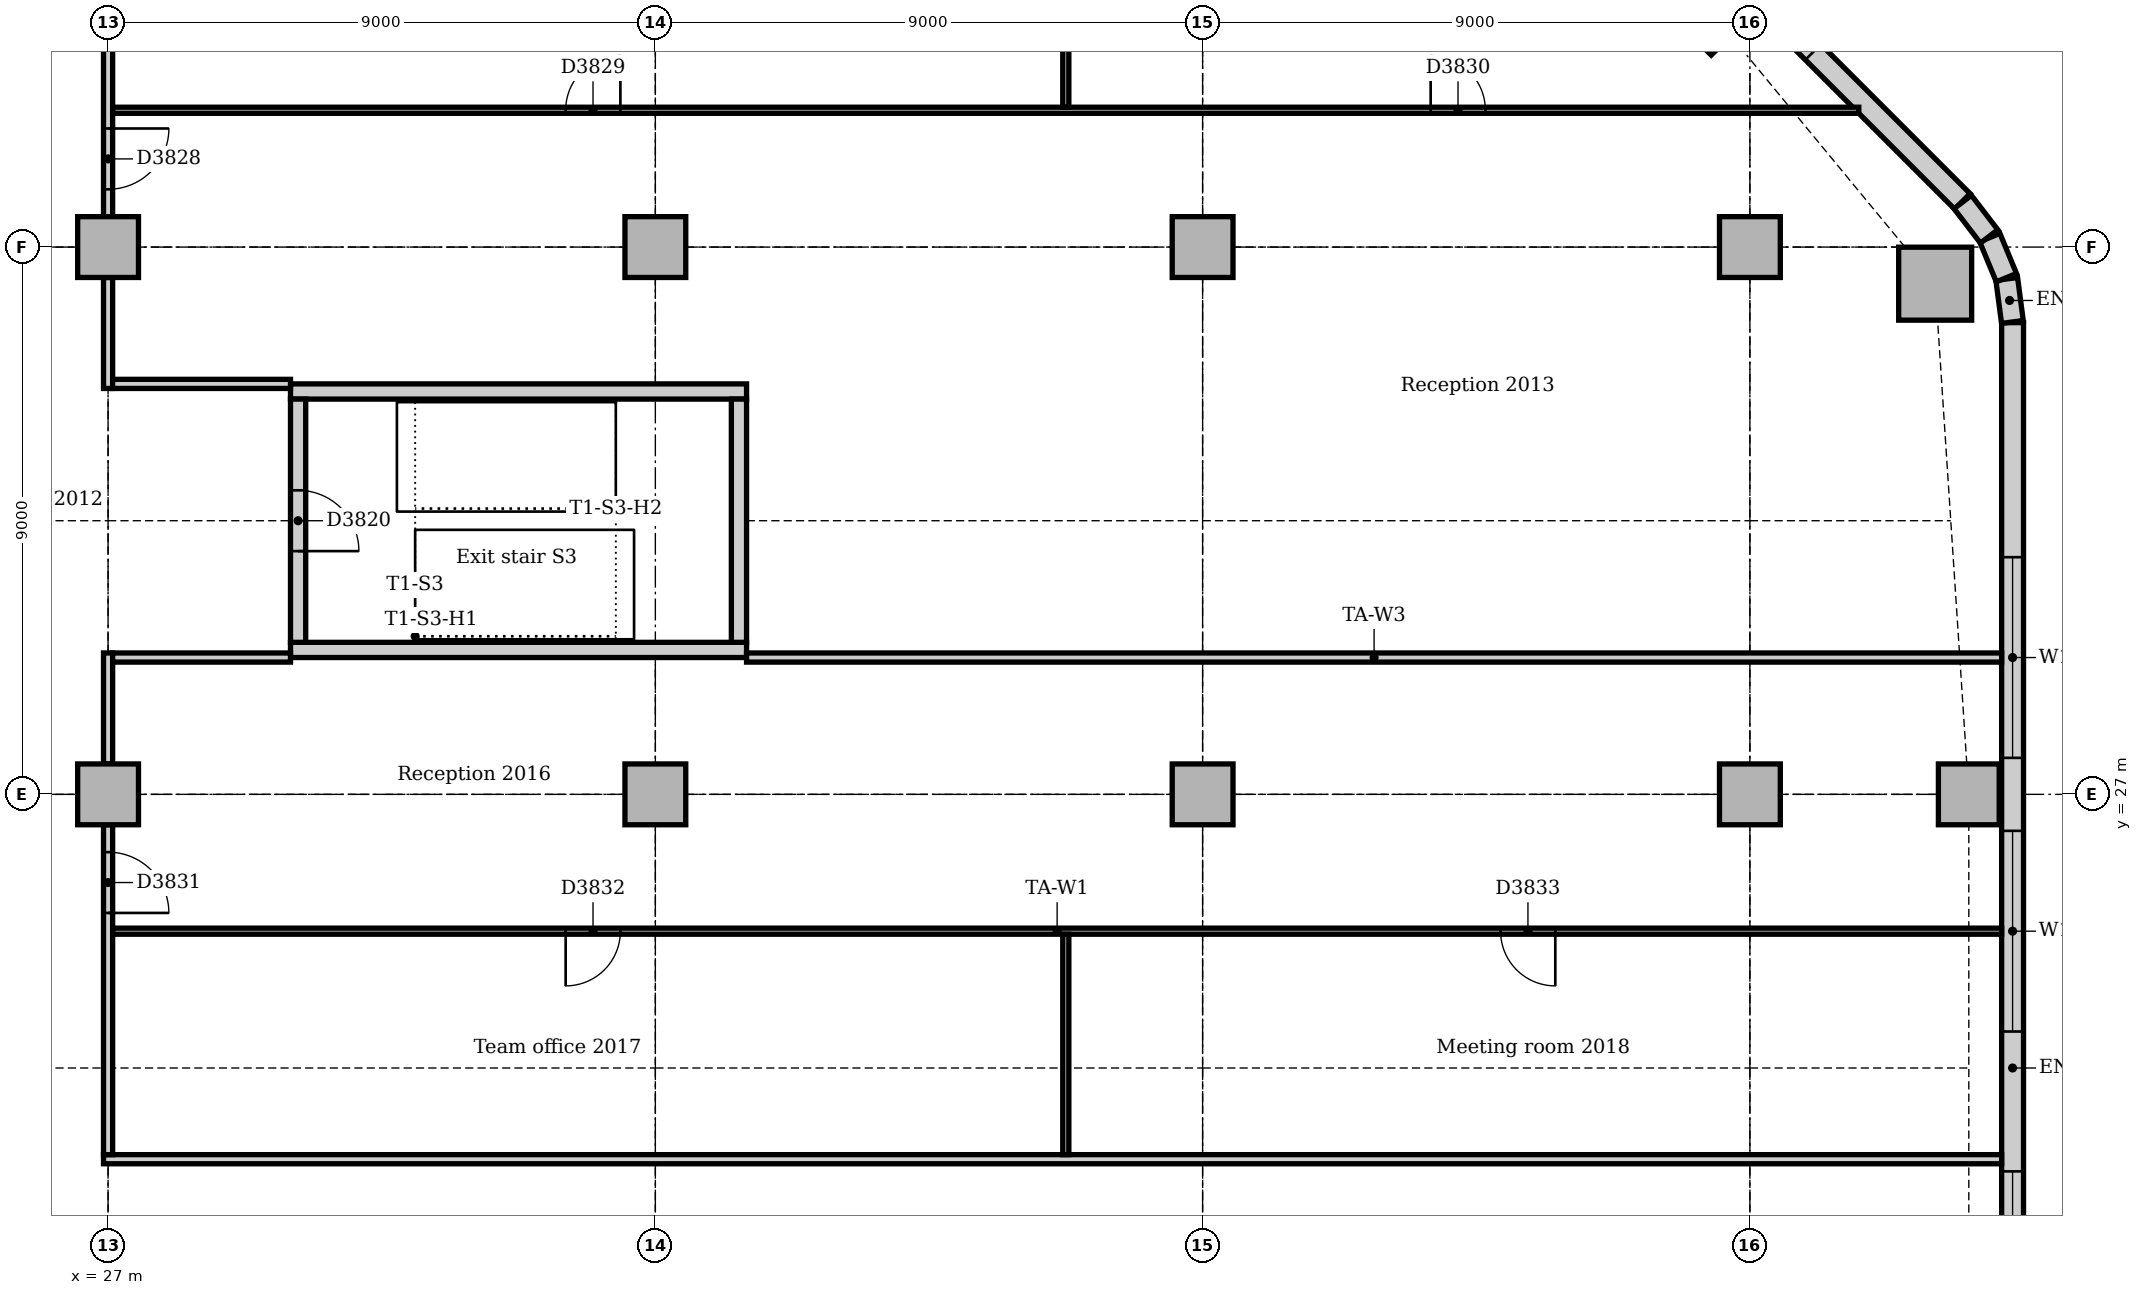
"""IFC4 building model, lengths in metres.
Left out: names, types, materials, properties, quantities, classifications, styles, units other than length and angle.
Written with IfcOpenShell. Run it as: python <this file> out.ifc"""

import sys

from ifc_helpers import new_model, si_unit, direction, frame, frame_2d, origin, origin_2d, place, context, subcontext, project, spatial, rectangle, extrude, element, fill, save


model = new_model("IFC4")
c1 = context("Model", 3, precision=1e-05, world=origin(), true_north=direction((0.0, 1.0)))
c2 = subcontext(c1, "Body", "Model", "MODEL_VIEW")
j1 = project(units=[si_unit("LENGTHUNIT", "METRE"), si_unit("PLANEANGLEUNIT", "RADIAN")], contexts=[c1])
p1 = place(None, origin())
s1 = spatial("IfcSite", under=j1, at=p1, CompositionType="ELEMENT")
p2 = place(p1, origin())
s2 = spatial("IfcBuilding", under=s1, at=p2, CompositionType="ELEMENT")
p3 = place(p2, frame((0.0, 0.0, 87.0)))
s3 = spatial("IfcBuildingStorey", under=s2, at=p3, CompositionType="ELEMENT", Elevation=87.0)
for number, where, z_axis, x_axis in (
    (1, (30.0, 29.375, 0.0), (0.0, 0.0, 1.0), (1.0, 0.0, 0.0)),
    (2, (37.5, 33.625, 0.0), (0.0, 0.0, 1.0), (-1.0, 0.0, 0.0)),
):
    element("IfcWall", number, at=place(p3, frame(where, z_axis=z_axis, x_axis=x_axis)), inside=s3, PredefinedType="SOLIDWALL", context=c2, shape_type="SweptSolid", body=[
        extrude(rectangle(XDim=7.5, YDim=0.25, at=frame_2d((3.75, 0.0))), origin(), (0.0, 0.0, 1.0), 4.0),
    ])
p4 = place(p3, frame((37.375, 29.5, 0.0), z_axis=(0.0, 0.0, 1.0), x_axis=(0.0, 1.0, 0.0)))
e3 = element("IfcWall", 3, at=p4, inside=s3, PredefinedType="SOLIDWALL", context=c2, shape_type="SweptSolid", body=[
    extrude(rectangle(XDim=4.0, YDim=0.25, at=frame_2d((2.0, 0.0))), origin(), (0.0, 0.0, 1.0), 4.0),
])
p5 = place(p3, frame((30.125, 33.5, 0.0), z_axis=(0.0, 0.0, 1.0), x_axis=(0.0, -1.0, 0.0)))
e4 = element("IfcWall", 4, at=p5, inside=s3, PredefinedType="SOLIDWALL", context=c2, shape_type="SweptSolid", body=[
    extrude(rectangle(XDim=4.0, YDim=0.25, at=frame_2d((2.0, 0.0))), origin(), (0.0, 0.0, 1.0), 4.0),
])
p6 = place(p5, frame((1.5, 0.0, 0.0)))
e5 = element("IfcOpeningElement", 5, at=p6, cuts=e4, PredefinedType="OPENING", context=c2, shape_type="SweptSolid", body=[
    extrude(rectangle(XDim=1.0, YDim=2.1, at=frame_2d((0.5, 1.05))), frame((0.0, 0.135, 0.0), z_axis=(0.0, -1.0, 0.0), x_axis=(1.0, 0.0, 0.0)), (0.0, 0.0, 1.0), 0.27),
])
p7 = place(p3, frame((57.047, 35.398, 0.0), z_axis=(0.0, 0.0, 1.0), x_axis=(1.0, 0.0, 0.0)))
e6 = element("IfcColumn", 6, at=p7, inside=s3, PredefinedType="COLUMN", context=c2, shape_type="SweptSolid", body=[
    extrude(rectangle(XDim=1.2, YDim=1.2, at=origin_2d()), origin(), (0.0, 0.0, 1.0), 3.85),
])
for number, where, z_axis, x_axis in (
    (7, (57.6, 27.0, 0.0), (0.0, 0.0, 1.0), (1.0, 0.0, 0.0)),
    (8, (53.364, 39.864, 0.0), (0.0, 0.0, 1.0), (0.707, 0.707, 0.0)),
    (9, (27.0, 27.0, 0.0), (0.0, 0.0, 1.0), (1.0, 0.0, 0.0)),
    (10, (27.0, 36.0, 0.0), (0.0, 0.0, 1.0), (1.0, 0.0, 0.0)),
    (11, (36.0, 27.0, 0.0), (0.0, 0.0, 1.0), (1.0, 0.0, 0.0)),
    (12, (36.0, 36.0, 0.0), (0.0, 0.0, 1.0), (1.0, 0.0, 0.0)),
    (13, (45.0, 27.0, 0.0), (0.0, 0.0, 1.0), (1.0, 0.0, 0.0)),
    (14, (45.0, 36.0, 0.0), (0.0, 0.0, 1.0), (1.0, 0.0, 0.0)),
    (15, (54.0, 27.0, 0.0), (0.0, 0.0, 1.0), (1.0, 0.0, 0.0)),
    (16, (54.0, 36.0, 0.0), (0.0, 0.0, 1.0), (1.0, 0.0, 0.0)),
):
    element("IfcColumn", number, at=place(p3, frame(where, z_axis=z_axis, x_axis=x_axis)), inside=s3, PredefinedType="COLUMN", context=c2, shape_type="SweptSolid", body=[
        extrude(rectangle(XDim=1.0, YDim=1.0, at=origin_2d()), origin(), (0.0, 0.0, 1.0), 3.85),
    ])
p8 = place(p3, frame((58.32, 10.243, 0.0), z_axis=(0.0, 0.0, 1.0), x_axis=(0.0, 1.0, 0.0)))
e17 = element("IfcWall", 17, at=p8, inside=s3, PredefinedType="STANDARD", context=c2, shape_type="SweptSolid", body=[
    extrude(rectangle(XDim=24.515, YDim=0.36, at=frame_2d((12.257, 0.0))), origin(), (0.0, 0.0, 1.0), 3.85),
])
p9 = place(p8, frame((3.857, 0.0, 0.9)))
e18 = element("IfcOpeningElement", 18, at=p9, cuts=e17, PredefinedType="OPENING", context=c2, shape_type="SweptSolid", body=[
    extrude(rectangle(XDim=3.3, YDim=1.6, at=frame_2d((1.65, 0.8))), frame((0.0, 0.19, 0.0), z_axis=(0.0, -1.0, 0.0), x_axis=(1.0, 0.0, 0.0)), (0.0, 0.0, 1.0), 0.38),
])
p10 = place(p8, frame((8.757, 0.0, 0.9)))
e19 = element("IfcOpeningElement", 19, at=p10, cuts=e17, PredefinedType="OPENING", context=c2, shape_type="SweptSolid", body=[
    extrude(rectangle(XDim=1.8, YDim=1.6, at=frame_2d((0.9, 0.8))), frame((0.0, 0.19, 0.0), z_axis=(0.0, -1.0, 0.0), x_axis=(1.0, 0.0, 0.0)), (0.0, 0.0, 1.0), 0.38),
])
p11 = place(p8, frame((12.857, 0.0, 0.9)))
e20 = element("IfcOpeningElement", 20, at=p11, cuts=e17, PredefinedType="OPENING", context=c2, shape_type="SweptSolid", body=[
    extrude(rectangle(XDim=3.3, YDim=1.6, at=frame_2d((1.65, 0.8))), frame((0.0, 0.19, 0.0), z_axis=(0.0, -1.0, 0.0), x_axis=(1.0, 0.0, 0.0)), (0.0, 0.0, 1.0), 0.38),
])
p12 = place(p8, frame((17.357, 0.0, 0.9)))
e21 = element("IfcOpeningElement", 21, at=p12, cuts=e17, PredefinedType="OPENING", context=c2, shape_type="SweptSolid", body=[
    extrude(rectangle(XDim=3.3, YDim=1.6, at=frame_2d((1.65, 0.8))), frame((0.0, 0.19, 0.0), z_axis=(0.0, -1.0, 0.0), x_axis=(1.0, 0.0, 0.0)), (0.0, 0.0, 1.0), 0.38),
])
p13 = place(p3, frame((57.494, 36.751, 0.0), z_axis=(0.0, 0.0, 1.0), x_axis=(-0.707106781187, 0.707106781187, 0.0)))
e22 = element("IfcWall", 22, at=p13, inside=s3, PredefinedType="STANDARD", context=c2, shape_type="SweptSolid", body=[
    extrude(rectangle(XDim=10.243, YDim=0.36, at=frame_2d((5.121, 0.0))), origin(), (0.0, 0.0, 1.0), 3.85),
])
p14 = place(p13, frame((3.471, 0.0, 0.9)))
e23 = element("IfcOpeningElement", 23, at=p14, cuts=e22, PredefinedType="OPENING", context=c2, shape_type="SweptSolid", body=[
    extrude(rectangle(XDim=3.3, YDim=1.6, at=frame_2d((1.65, 0.8))), frame((0.0, 0.19, 0.0), z_axis=(0.0, -1.0, 0.0), x_axis=(1.0, 0.0, 0.0)), (0.0, 0.0, 1.0), 0.38),
])
for number, where, z_axis, x_axis in (
    (24, (58.317, 34.769, 0.0), (0.0, 0.0, 1.0), (-0.131, 0.991, 0.0)),
    (25, (58.218, 35.497, 0.0), (0.0, 0.0, 1.0), (-0.383, 0.924, 0.0)),
):
    element("IfcWall", number, at=place(p3, frame(where, z_axis=z_axis, x_axis=x_axis)), inside=s3, PredefinedType="STANDARD", context=c2, shape_type="SweptSolid", body=[
        extrude(rectangle(XDim=0.713, YDim=0.36, at=frame_2d((0.356, 0.0))), origin(), (0.0, 0.0, 1.0), 3.85),
    ])
p15 = place(p3, frame((57.934, 36.175, 0.0), z_axis=(0.0, 0.0, 1.0), x_axis=(-0.608802368033, 0.793321924995, 0.0)))
e26 = element("IfcWall", 26, at=p15, inside=s3, PredefinedType="STANDARD", context=c2, shape_type="SweptSolid", body=[
    extrude(rectangle(XDim=0.713, YDim=0.36, at=frame_2d((0.357, 0.0))), origin(), (0.0, 0.0, 1.0), 3.85),
])
p16 = place(p3, frame((26.925, 21.0, 0.0), z_axis=(0.0, 0.0, 1.0), x_axis=(1.0, 0.0, 0.0)))
e27 = element("IfcWall", 27, at=p16, inside=s3, PredefinedType="PARTITIONING", context=c2, shape_type="SweptSolid", body=[
    extrude(rectangle(XDim=31.215, YDim=0.15, at=frame_2d((15.607, 0.0))), origin(), (0.0, 0.0, 1.0), 3.85),
])
p17 = place(p3, frame((27.0, 33.675, 0.0), z_axis=(0.0, 0.0, 1.0), x_axis=(0.0, 1.0, 0.0)))
e28 = element("IfcWall", 28, at=p17, inside=s3, PredefinedType="PARTITIONING", context=c2, shape_type="SweptSolid", body=[
    extrude(rectangle(XDim=1.825, YDim=0.15, at=frame_2d((0.912, 0.0))), origin(), (0.0, 0.0, 1.0), 3.158),
])
p18 = place(p3, frame((27.0, 36.5, 0.0), z_axis=(0.0, 0.0, 1.0), x_axis=(0.0, 1.0, 0.0)))
e29 = element("IfcWall", 29, at=p18, inside=s3, PredefinedType="PARTITIONING", context=c2, shape_type="SweptSolid", body=[
    extrude(rectangle(XDim=7.1, YDim=0.15, at=frame_2d((3.55, 0.0))), origin(), (0.0, 0.0, 1.0), 3.158),
])
p19 = place(p18, frame((0.45, 0.0, 0.0)))
e30 = element("IfcOpeningElement", 30, at=p19, cuts=e29, PredefinedType="OPENING", context=c2, shape_type="SweptSolid", body=[
    extrude(rectangle(XDim=1.0, YDim=2.1, at=frame_2d((0.5, 1.05))), frame((0.0, 0.085, 0.0), z_axis=(0.0, -1.0, 0.0), x_axis=(1.0, 0.0, 0.0)), (0.0, 0.0, 1.0), 0.17),
])
p20 = place(p3, frame((27.0, 21.075, 0.0), z_axis=(0.0, 0.0, 1.0), x_axis=(0.0, 1.0, 0.0)))
e31 = element("IfcWall", 31, at=p20, inside=s3, PredefinedType="PARTITIONING", context=c2, shape_type="SweptSolid", body=[
    extrude(rectangle(XDim=5.425, YDim=0.15, at=frame_2d((2.712, 0.0))), origin(), (0.0, 0.0, 1.0), 3.158),
])
p21 = place(p20, frame((3.975, 0.0, 0.0)))
e32 = element("IfcOpeningElement", 32, at=p21, cuts=e31, PredefinedType="OPENING", context=c2, shape_type="SweptSolid", body=[
    extrude(rectangle(XDim=1.0, YDim=2.1, at=frame_2d((0.5, 1.05))), frame((0.0, 0.085, 0.0), z_axis=(0.0, -1.0, 0.0), x_axis=(1.0, 0.0, 0.0)), (0.0, 0.0, 1.0), 0.17),
])
p22 = place(p3, frame((27.0, 27.5, 0.0), z_axis=(0.0, 0.0, 1.0), x_axis=(0.0, 1.0, 0.0)))
e33 = element("IfcWall", 33, at=p22, inside=s3, PredefinedType="PARTITIONING", context=c2, shape_type="SweptSolid", body=[
    extrude(rectangle(XDim=1.825, YDim=0.15, at=frame_2d((0.912, 0.0))), origin(), (0.0, 0.0, 1.0), 3.158),
])
for number, where, z_axis, x_axis in (
    (34, (27.075, 29.25, 0.0), (0.0, 0.0, 1.0), (1.0, 0.0, 0.0)),
    (35, (27.075, 33.75, 0.0), (0.0, 0.0, 1.0), (1.0, 0.0, 0.0)),
):
    element("IfcWall", number, at=place(p3, frame(where, z_axis=z_axis, x_axis=x_axis)), inside=s3, PredefinedType="PARTITIONING", context=c2, shape_type="SweptSolid", body=[
        extrude(rectangle(XDim=2.925, YDim=0.15, at=frame_2d((1.462, 0.0))), origin(), (0.0, 0.0, 1.0), 3.85),
    ])
p23 = place(p3, frame((37.5, 29.25, 0.0), z_axis=(0.0, 0.0, 1.0), x_axis=(1.0, 0.0, 0.0)))
e36 = element("IfcWall", 36, at=p23, inside=s3, PredefinedType="PARTITIONING", context=c2, shape_type="SweptSolid", body=[
    extrude(rectangle(XDim=20.64, YDim=0.15, at=frame_2d((10.32, 0.0))), origin(), (0.0, 0.0, 1.0), 3.85),
])
p24 = place(p3, frame((27.075, 24.75, 0.0), z_axis=(0.0, 0.0, 1.0), x_axis=(1.0, 0.0, 0.0)))
e37 = element("IfcWall", 37, at=p24, inside=s3, PredefinedType="PARTITIONING", context=c2, shape_type="SweptSolid", body=[
    extrude(rectangle(XDim=31.065, YDim=0.1, at=frame_2d((15.533, 0.0))), origin(), (0.0, 0.0, 1.0), 3.85),
])
p25 = place(p24, frame((7.45, 0.0, 0.0)))
e38 = element("IfcOpeningElement", 38, at=p25, cuts=e37, PredefinedType="OPENING", context=c2, shape_type="SweptSolid", body=[
    extrude(rectangle(XDim=0.9, YDim=2.1, at=frame_2d((0.45, 1.05))), frame((0.0, 0.06, 0.0), z_axis=(0.0, -1.0, 0.0), x_axis=(1.0, 0.0, 0.0)), (0.0, 0.0, 1.0), 0.12),
])
p26 = place(p24, frame((22.825, 0.0, 0.0)))
e39 = element("IfcOpeningElement", 39, at=p26, cuts=e37, PredefinedType="OPENING", context=c2, shape_type="SweptSolid", body=[
    extrude(rectangle(XDim=0.9, YDim=2.1, at=frame_2d((0.45, 1.05))), frame((0.0, 0.06, 0.0), z_axis=(0.0, -1.0, 0.0), x_axis=(1.0, 0.0, 0.0)), (0.0, 0.0, 1.0), 0.12),
])
p27 = place(p3, frame((27.075, 38.25, 0.0), z_axis=(0.0, 0.0, 1.0), x_axis=(1.0, 0.0, 0.0)))
e40 = element("IfcWall", 40, at=p27, inside=s3, PredefinedType="PARTITIONING", context=c2, shape_type="SweptSolid", body=[
    extrude(rectangle(XDim=28.716, YDim=0.1, at=frame_2d((14.358, 0.0))), origin(), (0.0, 0.0, 1.0), 3.85),
])
p28 = place(p27, frame((7.45, 0.0, 0.0)))
e41 = element("IfcOpeningElement", 41, at=p28, cuts=e40, PredefinedType="OPENING", context=c2, shape_type="SweptSolid", body=[
    extrude(rectangle(XDim=0.9, YDim=2.1, at=frame_2d((0.45, 1.05))), frame((0.0, 0.06, 0.0), z_axis=(0.0, -1.0, 0.0), x_axis=(1.0, 0.0, 0.0)), (0.0, 0.0, 1.0), 0.12),
])
p29 = place(p27, frame((21.675, 0.0, 0.0)))
e42 = element("IfcOpeningElement", 42, at=p29, cuts=e40, PredefinedType="OPENING", context=c2, shape_type="SweptSolid", body=[
    extrude(rectangle(XDim=0.9, YDim=2.1, at=frame_2d((0.45, 1.05))), frame((0.0, 0.06, 0.0), z_axis=(0.0, -1.0, 0.0), x_axis=(1.0, 0.0, 0.0)), (0.0, 0.0, 1.0), 0.12),
])
p30 = place(p3, frame((42.75, 38.3, 0.0), z_axis=(0.0, 0.0, 1.0), x_axis=(0.0, 1.0, 0.0)))
e43 = element("IfcWall", 43, at=p30, inside=s3, PredefinedType="PARTITIONING", context=c2, shape_type="SweptSolid", body=[
    extrude(rectangle(XDim=6.34, YDim=0.1, at=frame_2d((3.17, 0.0))), origin(), (0.0, 0.0, 1.0), 3.85),
])
p31 = place(p3, frame((42.75, 21.075, 0.0), z_axis=(0.0, 0.0, 1.0), x_axis=(0.0, 1.0, 0.0)))
e44 = element("IfcWall", 44, at=p31, inside=s3, PredefinedType="PARTITIONING", context=c2, shape_type="SweptSolid", body=[
    extrude(rectangle(XDim=3.625, YDim=0.1, at=frame_2d((1.812, 0.0))), origin(), (0.0, 0.0, 1.0), 3.85),
])
p32 = place(p10, origin())
e45 = element("IfcWindow", 45, at=p32, inside=s3, PartitioningType="SINGLE_PANEL", PredefinedType="WINDOW", context=c2, shape_type="SweptSolid", body=[
    extrude(rectangle(XDim=1.8, YDim=1.6, at=frame_2d((0.9, 0.8))), frame((0.0, 0.13, 0.0), z_axis=(0.0, -1.0, 0.0), x_axis=(1.0, 0.0, 0.0)), (0.0, 0.0, 1.0), 0.06),
])
fill(e19, e45)
p33 = place(p11, origin())
e46 = element("IfcWindow", 46, at=p33, inside=s3, PartitioningType="SINGLE_PANEL", PredefinedType="WINDOW", context=c2, shape_type="SweptSolid", body=[
    extrude(rectangle(XDim=3.3, YDim=1.6, at=frame_2d((1.65, 0.8))), frame((0.0, 0.13, 0.0), z_axis=(0.0, -1.0, 0.0), x_axis=(1.0, 0.0, 0.0)), (0.0, 0.0, 1.0), 0.06),
])
fill(e20, e46)
p34 = place(p12, origin())
e47 = element("IfcWindow", 47, at=p34, inside=s3, PartitioningType="SINGLE_PANEL", PredefinedType="WINDOW", context=c2, shape_type="SweptSolid", body=[
    extrude(rectangle(XDim=3.3, YDim=1.6, at=frame_2d((1.65, 0.8))), frame((0.0, 0.13, 0.0), z_axis=(0.0, -1.0, 0.0), x_axis=(1.0, 0.0, 0.0)), (0.0, 0.0, 1.0), 0.06),
])
fill(e21, e47)
p35 = place(p14, origin())
e48 = element("IfcWindow", 48, at=p35, inside=s3, PartitioningType="SINGLE_PANEL", PredefinedType="WINDOW", context=c2, shape_type="SweptSolid", body=[
    extrude(rectangle(XDim=3.3, YDim=1.6, at=frame_2d((1.65, 0.8))), frame((0.0, 0.13, 0.0), z_axis=(0.0, -1.0, 0.0), x_axis=(1.0, 0.0, 0.0)), (0.0, 0.0, 1.0), 0.06),
])
fill(e23, e48)
p36 = place(p6, origin())
e49 = element("IfcDoor", 49, at=p36, inside=s3, OperationType="SINGLE_SWING_RIGHT", PredefinedType="DOOR", context=c2, shape_type="SweptSolid", body=[
    extrude(rectangle(XDim=1.0, YDim=2.1, at=frame_2d((0.5, 1.05))), frame((0.0, 0.025, 0.0), z_axis=(0.0, -1.0, 0.0), x_axis=(1.0, 0.0, 0.0)), (0.0, 0.0, 1.0), 0.05),
])
fill(e5, e49)
p37 = place(p19, frame((1.0, 0.0, 0.0), z_axis=(0.0, 0.0, 1.0), x_axis=(-1.0, 0.0, 0.0)))
e50 = element("IfcDoor", 50, at=p37, inside=s3, OperationType="SINGLE_SWING_LEFT", PredefinedType="DOOR", context=c2, shape_type="SweptSolid", body=[
    extrude(rectangle(XDim=1.0, YDim=2.1, at=frame_2d((0.5, 1.05))), frame((0.0, 0.025, 0.0), z_axis=(0.0, -1.0, 0.0), x_axis=(1.0, 0.0, 0.0)), (0.0, 0.0, 1.0), 0.05),
])
fill(e30, e50)
p38 = place(p28, origin())
e51 = element("IfcDoor", 51, at=p38, inside=s3, OperationType="SINGLE_SWING_RIGHT", PredefinedType="DOOR", context=c2, shape_type="SweptSolid", body=[
    extrude(rectangle(XDim=0.9, YDim=2.1, at=frame_2d((0.45, 1.05))), frame((0.0, 0.025, 0.0), z_axis=(0.0, -1.0, 0.0), x_axis=(1.0, 0.0, 0.0)), (0.0, 0.0, 1.0), 0.05),
])
fill(e41, e51)
p39 = place(p29, origin())
e52 = element("IfcDoor", 52, at=p39, inside=s3, OperationType="SINGLE_SWING_LEFT", PredefinedType="DOOR", context=c2, shape_type="SweptSolid", body=[
    extrude(rectangle(XDim=0.9, YDim=2.1, at=frame_2d((0.45, 1.05))), frame((0.0, 0.025, 0.0), z_axis=(0.0, -1.0, 0.0), x_axis=(1.0, 0.0, 0.0)), (0.0, 0.0, 1.0), 0.05),
])
fill(e42, e52)
p40 = place(p21, frame((1.0, 0.0, 0.0), z_axis=(0.0, 0.0, 1.0), x_axis=(-1.0, 0.0, 0.0)))
e53 = element("IfcDoor", 53, at=p40, inside=s3, OperationType="SINGLE_SWING_RIGHT", PredefinedType="DOOR", context=c2, shape_type="SweptSolid", body=[
    extrude(rectangle(XDim=1.0, YDim=2.1, at=frame_2d((0.5, 1.05))), frame((0.0, 0.025, 0.0), z_axis=(0.0, -1.0, 0.0), x_axis=(1.0, 0.0, 0.0)), (0.0, 0.0, 1.0), 0.05),
])
fill(e32, e53)
p41 = place(p25, frame((0.9, 0.0, 0.0), z_axis=(0.0, 0.0, 1.0), x_axis=(-1.0, 0.0, 0.0)))
e54 = element("IfcDoor", 54, at=p41, inside=s3, OperationType="SINGLE_SWING_RIGHT", PredefinedType="DOOR", context=c2, shape_type="SweptSolid", body=[
    extrude(rectangle(XDim=0.9, YDim=2.1, at=frame_2d((0.45, 1.05))), frame((0.0, 0.025, 0.0), z_axis=(0.0, -1.0, 0.0), x_axis=(1.0, 0.0, 0.0)), (0.0, 0.0, 1.0), 0.05),
])
fill(e38, e54)
p42 = place(p26, frame((0.9, 0.0, 0.0), z_axis=(0.0, 0.0, 1.0), x_axis=(-1.0, 0.0, 0.0)))
e55 = element("IfcDoor", 55, at=p42, inside=s3, OperationType="SINGLE_SWING_LEFT", PredefinedType="DOOR", context=c2, shape_type="SweptSolid", body=[
    extrude(rectangle(XDim=0.9, YDim=2.1, at=frame_2d((0.45, 1.05))), frame((0.0, 0.025, 0.0), z_axis=(0.0, -1.0, 0.0), x_axis=(1.0, 0.0, 0.0)), (0.0, 0.0, 1.0), 0.05),
])
fill(e39, e55)
save(model, sys.argv[1])
